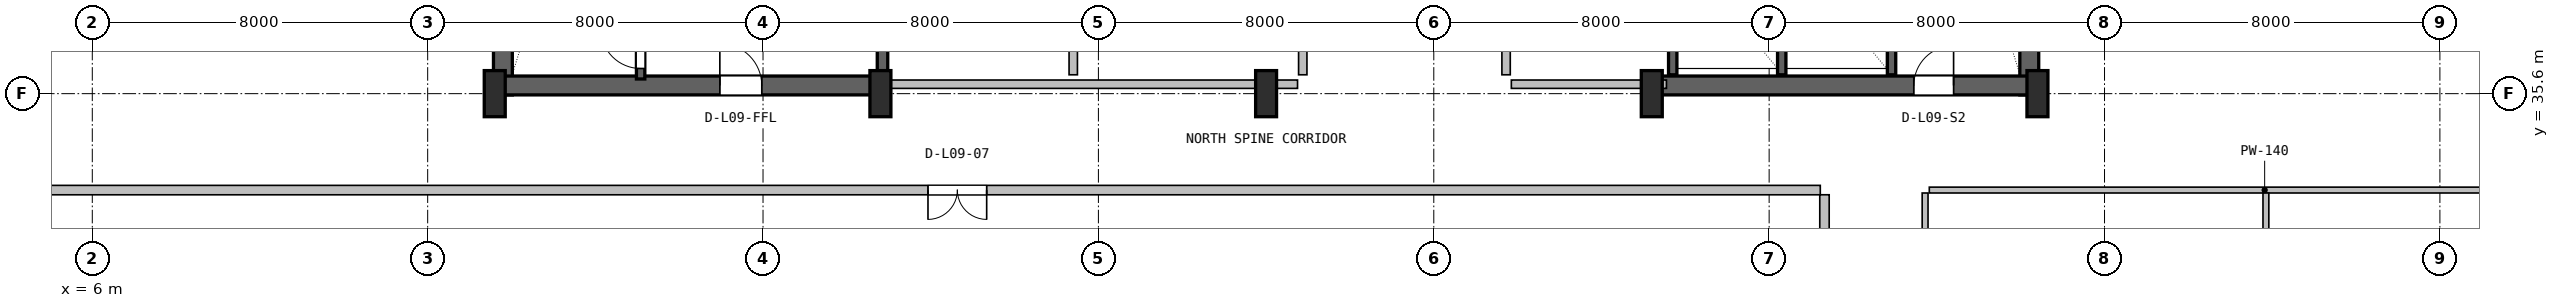
"""IFC4 building model, lengths in metres.
Left out: names, types, materials, properties, quantities, classifications, styles, units other than length and angle.
Written with IfcOpenShell. Run it as: python <this file> out.ifc"""

import sys

from ifc_helpers import new_model, si_unit, direction, frame, frame_2d, origin, origin_2d, place, context, subcontext, project, spatial, rectangle, i_section, extrude, source, transform, mapped, element, fill, save


model = new_model("IFC4")
c1 = context("Model", 3, precision=1e-05, world=origin(), true_north=direction((0.0, 1.0)))
c2 = subcontext(c1, "Body", "Model", "MODEL_VIEW")
j1 = project(units=[si_unit("LENGTHUNIT", "METRE"), si_unit("PLANEANGLEUNIT", "RADIAN")], contexts=[c1])
p1 = place(None, origin())
s1 = spatial("IfcSite", under=j1, at=p1, CompositionType="ELEMENT")
p2 = place(p1, origin())
s2 = spatial("IfcBuilding", under=s1, at=p2, CompositionType="ELEMENT")
p3 = place(p2, frame((0.0, 0.0, 43.2)))
s3 = spatial("IfcBuildingStorey", under=s2, at=p3, CompositionType="ELEMENT", Elevation=43.2)
for number, where, z_axis, x_axis in (
    (1, (15.795, 35.57, 0.0), (0.0, 0.0, 1.0), (0.0, 1.0, 0.0)),
    (2, (52.205, 35.57, 0.0), (0.0, 0.0, 1.0), (0.0, 1.0, 0.0)),
):
    element("IfcWall", number, at=place(p3, frame(where, z_axis=z_axis, x_axis=x_axis)), inside=s3, PredefinedType="SHEAR", context=c2, shape_type="SweptSolid", body=[
        extrude(rectangle(XDim=11.23, YDim=0.45, at=frame_2d((5.615, 0.0))), origin(), (0.0, 0.0, 1.0), 3.65),
    ])
p4 = place(p3, frame((15.57, 35.795, 0.0), z_axis=(0.0, 0.0, 1.0), x_axis=(1.0, 0.0, 0.0)))
e3 = element("IfcWall", 3, at=p4, inside=s3, PredefinedType="SHEAR", context=c2, shape_type="SweptSolid", body=[
    extrude(rectangle(XDim=9.23, YDim=0.45, at=frame_2d((4.615, 0.0))), origin(), (0.0, 0.0, 1.0), 3.65),
])
p5 = place(p4, frame((5.4, 0.0, 0.0)))
e4 = element("IfcOpeningElement", 4, at=p5, cuts=e3, PredefinedType="OPENING", context=c2, shape_type="SweptSolid", body=[
    extrude(rectangle(XDim=1.0, YDim=2.1, at=frame_2d((0.5, 1.05))), frame((0.0, 0.235, 0.0), z_axis=(0.0, -1.0, 0.0), x_axis=(1.0, 0.0, 0.0)), (0.0, 0.0, 1.0), 0.47),
])
p6 = place(p3, frame((43.2, 35.795, 0.0), z_axis=(0.0, 0.0, 1.0), x_axis=(1.0, 0.0, 0.0)))
e5 = element("IfcWall", 5, at=p6, inside=s3, PredefinedType="SHEAR", context=c2, shape_type="SweptSolid", body=[
    extrude(rectangle(XDim=9.23, YDim=0.45, at=frame_2d((4.615, 0.0))), origin(), (0.0, 0.0, 1.0), 3.65),
])
p7 = place(p6, frame((6.25, 0.0, 0.0)))
e6 = element("IfcOpeningElement", 6, at=p7, cuts=e5, PredefinedType="OPENING", context=c2, shape_type="SweptSolid", body=[
    extrude(rectangle(XDim=0.95, YDim=2.1, at=frame_2d((0.475, 1.05))), frame((0.0, 0.235, 0.0), z_axis=(0.0, -1.0, 0.0), x_axis=(1.0, 0.0, 0.0)), (0.0, 0.0, 1.0), 0.47),
])
m1 = source(origin(), c2, "Body", "SweptSolid", [
    extrude(i_section(OverallWidth=0.5, OverallDepth=1.1, WebThickness=0.018, FlangeThickness=0.032, FilletRadius=0.018, at=origin_2d()), origin(), (0.0, 0.0, 1.0), 3.9),
])
for number, where, z_axis, x_axis in (
    (7, (15.6, 35.6, 0.0), (0.0, 0.0, 1.0), (1.0, 0.0, 0.0)),
    (8, (24.8, 35.6, 0.0), (0.0, 0.0, 1.0), (1.0, 0.0, 0.0)),
    (9, (34.0, 35.6, 0.0), (0.0, 0.0, 1.0), (1.0, 0.0, 0.0)),
    (10, (43.2, 35.6, 0.0), (0.0, 0.0, 1.0), (1.0, 0.0, 0.0)),
    (11, (52.4, 35.6, 0.0), (0.0, 0.0, 1.0), (1.0, 0.0, 0.0)),
):
    element("IfcColumn", number, at=place(p3, frame(where, z_axis=z_axis, x_axis=x_axis)), inside=s3, PredefinedType="COLUMN", context=c2, shape_type="MappedRepresentation", body=[
        mapped(m1, transform((0.0, 0.0, 0.0), x_axis=(1.0, 0.0, 0.0), y_axis=(0.0, 1.0, 0.0), z_axis=(0.0, 0.0, 1.0), scale=1.0)),
    ])
p8 = place(p3, frame((19.08, 35.95, 0.0), z_axis=(0.0, 0.0, 1.0), x_axis=(0.0, 1.0, 0.0)))
e12 = element("IfcWall", 12, at=p8, inside=s3, PredefinedType="SHEAR", context=c2, shape_type="SweptSolid", body=[
    extrude(rectangle(XDim=9.65, YDim=0.2, at=frame_2d((4.825, 0.0))), origin(), (0.0, 0.0, 1.0), 3.65),
])
p9 = place(p8, frame((0.25, 0.0, 0.0)))
e13 = element("IfcOpeningElement", 13, at=p9, cuts=e12, PredefinedType="OPENING", context=c2, shape_type="SweptSolid", body=[
    extrude(rectangle(XDim=0.95, YDim=2.1, at=frame_2d((0.475, 1.05))), frame((0.0, 0.11, 0.0), z_axis=(0.0, -1.0, 0.0), x_axis=(1.0, 0.0, 0.0)), (0.0, 0.0, 1.0), 0.22),
])
p10 = place(p3, frame((24.85, 36.05, 0.0), z_axis=(0.0, 0.0, 1.0), x_axis=(0.0, 1.0, 0.0)))
e14 = element("IfcWall", 14, at=p10, inside=s3, PredefinedType="SHEAR", context=c2, shape_type="SweptSolid", body=[
    extrude(rectangle(XDim=10.45, YDim=0.25, at=frame_2d((5.225, 0.0))), origin(), (0.0, 0.0, 1.0), 3.65),
])
p11 = place(p3, frame((48.92, 36.05, 0.0), z_axis=(0.0, 0.0, 1.0), x_axis=(0.0, 1.0, 0.0)))
e15 = element("IfcWall", 15, at=p11, inside=s3, PredefinedType="SHEAR", context=c2, shape_type="SweptSolid", body=[
    extrude(rectangle(XDim=10.5, YDim=0.2, at=frame_2d((5.25, 0.0))), origin(), (0.0, 0.0, 1.0), 3.65),
])
for number, where, z_axis, x_axis in (
    (16, (43.7, 36.05, 0.0), (0.0, 0.0, 1.0), (0.0, 1.0, 0.0)),
    (17, (46.3, 36.05, 0.0), (0.0, 0.0, 1.0), (0.0, 1.0, 0.0)),
):
    element("IfcWall", number, at=place(p3, frame(where, z_axis=z_axis, x_axis=x_axis)), inside=s3, PredefinedType="SHEAR", context=c2, shape_type="SweptSolid", body=[
        extrude(rectangle(XDim=3.05, YDim=0.2, at=frame_2d((1.525, 0.0))), origin(), (0.0, 0.0, 1.0), 3.65),
    ])
p12 = place(p3, frame((25.0, 35.825, 0.0), z_axis=(0.0, 0.0, 1.0), x_axis=(1.0, 0.0, 0.0)))
e18 = element("IfcWall", 18, at=p12, inside=s3, PredefinedType="PLUMBINGWALL", context=c2, shape_type="SweptSolid", body=[
    extrude(rectangle(XDim=9.75, YDim=0.2, at=frame_2d((4.875, 0.0))), origin(), (0.0, 0.0, 1.0), 2.425),
])
for number, where, z_axis, x_axis in (
    (19, (29.4, 36.05, 0.0), (0.0, 0.0, 1.0), (0.0, 1.0, 0.0)),
    (20, (34.875, 36.05, 0.0), (0.0, 0.0, 1.0), (0.0, 1.0, 0.0)),
):
    element("IfcWall", number, at=place(p3, frame(where, z_axis=z_axis, x_axis=x_axis)), inside=s3, PredefinedType="PLUMBINGWALL", context=c2, shape_type="SweptSolid", body=[
        extrude(rectangle(XDim=3.1, YDim=0.2, at=frame_2d((1.55, 0.0))), origin(), (0.0, 0.0, 1.0), 3.63),
    ])
p13 = place(p3, frame((39.85, 35.825, 0.0), z_axis=(0.0, 0.0, 1.0), x_axis=(1.0, 0.0, 0.0)))
e21 = element("IfcWall", 21, at=p13, inside=s3, PredefinedType="SOLIDWALL", context=c2, shape_type="SweptSolid", body=[
    extrude(rectangle(XDim=3.7, YDim=0.2, at=frame_2d((1.85, 0.0))), origin(), (0.0, 0.0, 1.0), 2.425),
])
p14 = place(p3, frame((39.725, 36.05, 0.0), z_axis=(0.0, 0.0, 1.0), x_axis=(0.0, 1.0, 0.0)))
e22 = element("IfcWall", 22, at=p14, inside=s3, PredefinedType="SOLIDWALL", context=c2, shape_type="SweptSolid", body=[
    extrude(rectangle(XDim=3.1, YDim=0.2, at=frame_2d((1.55, 0.0))), origin(), (0.0, 0.0, 1.0), 3.63),
])
p15 = place(p3, frame((47.32, 13.203, 0.0), z_axis=(0.0, 0.0, 1.0), x_axis=(0.0, 1.0, 0.0)))
e23 = element("IfcWall", 23, at=p15, inside=s3, PredefinedType="PARTITIONING", context=c2, shape_type="SweptSolid", body=[
    extrude(rectangle(XDim=19.985, YDim=0.225, at=frame_2d((9.993, 0.0))), origin(), (0.0, 0.0, 1.0), 3.322),
])
p16 = place(p3, frame((2.18, 33.3, 0.0), z_axis=(0.0, 0.0, 1.0), x_axis=(1.0, 0.0, 0.0)))
e24 = element("IfcWall", 24, at=p16, inside=s3, PredefinedType="PARTITIONING", context=c2, shape_type="SweptSolid", body=[
    extrude(rectangle(XDim=45.04, YDim=0.225, at=frame_2d((22.52, 0.0))), origin(), (0.0, 0.0, 1.0), 2.852),
])
p17 = place(p16, frame((23.755, 0.0, 0.0)))
e25 = element("IfcOpeningElement", 25, at=p17, cuts=e24, PredefinedType="OPENING", context=c2, shape_type="SweptSolid", body=[
    extrude(rectangle(XDim=1.4, YDim=2.12, at=frame_2d((0.7, 1.06))), frame((0.0, 0.123, 0.0), z_axis=(0.0, -1.0, 0.0), x_axis=(1.0, 0.0, 0.0)), (0.0, 0.0, 1.0), 0.245),
])
p18 = place(p3, frame((49.82, 33.3, 0.0), z_axis=(0.0, 0.0, 1.0), x_axis=(1.0, 0.0, 0.0)))
e26 = element("IfcWall", 26, at=p18, inside=s3, PredefinedType="PARTITIONING", context=c2, shape_type="SweptSolid", body=[
    extrude(rectangle(XDim=16.0, YDim=0.14, at=frame_2d((8.0, 0.0))), origin(), (0.0, 0.0, 1.0), 3.208),
])
p19 = place(p3, frame((57.85, 12.2, 0.0), z_axis=(0.0, 0.0, 1.0), x_axis=(0.0, 1.0, 0.0)))
e27 = element("IfcWall", 27, at=p19, inside=s3, PredefinedType="PARTITIONING", context=c2, shape_type="SweptSolid", body=[
    extrude(rectangle(XDim=21.03, YDim=0.14, at=frame_2d((10.515, 0.0))), origin(), (0.0, 0.0, 1.0), 3.322),
])
p20 = place(p3, frame((49.72, 1.38, 0.0), z_axis=(0.0, 0.0, 1.0), x_axis=(0.0, 1.0, 0.0)))
e28 = element("IfcWall", 28, at=p20, inside=s3, PredefinedType="PARTITIONING", context=c2, shape_type="SweptSolid", body=[
    extrude(rectangle(XDim=31.85, YDim=0.14, at=frame_2d((15.925, 0.0))), origin(), (0.0, 0.0, 1.0), 3.208),
])
p21 = place(p20, frame((5.405, 0.0, 0.0)))
e29 = element("IfcOpeningElement", 29, at=p21, cuts=e28, PredefinedType="OPENING", context=c2, shape_type="SweptSolid", body=[
    extrude(rectangle(XDim=1.0, YDim=2.1, at=frame_2d((0.5, 1.05))), frame((0.0, 0.08, 0.0), z_axis=(0.0, -1.0, 0.0), x_axis=(1.0, 0.0, 0.0)), (0.0, 0.0, 1.0), 0.16),
])
p22 = place(p20, frame((20.685, 0.0, 0.0)))
e30 = element("IfcOpeningElement", 30, at=p22, cuts=e28, PredefinedType="OPENING", context=c2, shape_type="SweptSolid", body=[
    extrude(rectangle(XDim=1.4, YDim=2.12, at=frame_2d((0.7, 1.06))), frame((0.0, 0.08, 0.0), z_axis=(0.0, -1.0, 0.0), x_axis=(1.0, 0.0, 0.0)), (0.0, 0.0, 1.0), 0.16),
])
m2 = source(origin(), c2, "Body", "SweptSolid", [
    extrude(rectangle(XDim=0.95, YDim=2.1, at=frame_2d((0.475, 1.05))), frame((0.0, 0.025, 0.0), z_axis=(0.0, -1.0, 0.0), x_axis=(1.0, 0.0, 0.0)), (0.0, 0.0, 1.0), 0.05),
])
p23 = place(p9, origin())
e31 = element("IfcDoor", 31, at=p23, inside=s3, OperationType="SINGLE_SWING_RIGHT", PredefinedType="DOOR", context=c2, shape_type="MappedRepresentation", body=[
    mapped(m2, transform((0.0, 0.0, 0.0), x_axis=(1.0, 0.0, 0.0), y_axis=(0.0, 1.0, 0.0), z_axis=(0.0, 0.0, 1.0), scale=1.0)),
])
fill(e13, e31)
m3 = source(origin(), c2, "Body", "SweptSolid", [
    extrude(rectangle(XDim=1.0, YDim=2.1, at=frame_2d((0.5, 1.05))), frame((0.0, 0.025, 0.0), z_axis=(0.0, -1.0, 0.0), x_axis=(1.0, 0.0, 0.0)), (0.0, 0.0, 1.0), 0.05),
])
p24 = place(p5, origin())
e32 = element("IfcDoor", 32, at=p24, inside=s3, OperationType="SINGLE_SWING_LEFT", PredefinedType="DOOR", context=c2, shape_type="MappedRepresentation", body=[
    mapped(m3, transform((0.0, 0.0, 0.0), x_axis=(1.0, 0.0, 0.0), y_axis=(0.0, 1.0, 0.0), z_axis=(0.0, 0.0, 1.0), scale=1.0)),
])
fill(e4, e32)
p25 = place(p7, origin())
e33 = element("IfcDoor", 33, at=p25, inside=s3, OperationType="SINGLE_SWING_RIGHT", PredefinedType="DOOR", context=c2, shape_type="MappedRepresentation", body=[
    mapped(m2, transform((0.0, 0.0, 0.0), x_axis=(1.0, 0.0, 0.0), y_axis=(0.0, 1.0, 0.0), z_axis=(0.0, 0.0, 1.0), scale=1.0)),
])
fill(e6, e33)
m4 = source(origin(), c2, "Body", "SweptSolid", [
    extrude(rectangle(XDim=1.4, YDim=2.12, at=frame_2d((0.7, 1.06))), frame((0.0, 0.025, 0.0), z_axis=(0.0, -1.0, 0.0), x_axis=(1.0, 0.0, 0.0)), (0.0, 0.0, 1.0), 0.05),
])
p26 = place(p17, frame((1.4, 0.0, 0.0), z_axis=(0.0, 0.0, 1.0), x_axis=(-1.0, 0.0, 0.0)))
e34 = element("IfcDoor", 34, at=p26, inside=s3, OperationType="DOUBLE_DOOR_SINGLE_SWING", PredefinedType="DOOR", context=c2, shape_type="MappedRepresentation", body=[
    mapped(m4, transform((0.0, 0.0, 0.0), x_axis=(1.0, 0.0, 0.0), y_axis=(0.0, 1.0, 0.0), z_axis=(0.0, 0.0, 1.0), scale=1.0)),
])
fill(e25, e34)
save(model, sys.argv[1])
